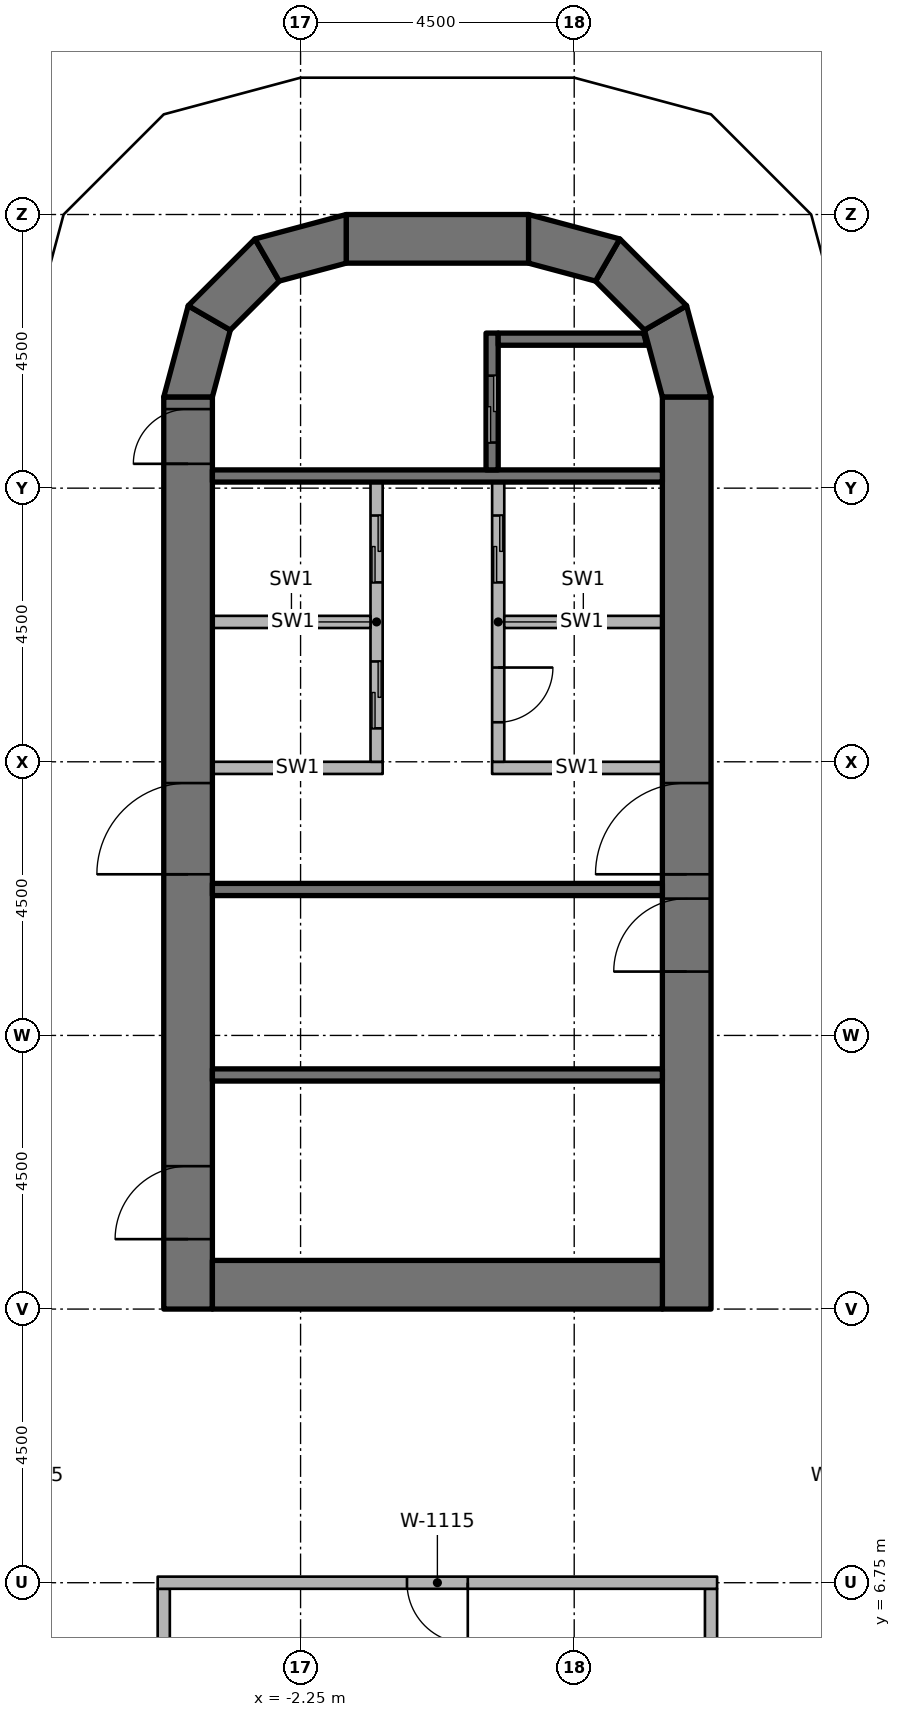
"""IFC4 building model, lengths in metres.
Left out: names, types, materials, properties, quantities, classifications, styles, units other than length and angle.
Written with IfcOpenShell. Run it as: python <this file> out.ifc"""

import sys

from ifc_helpers import new_model, si_unit, direction, frame, frame_2d, origin, origin_2d, place, context, subcontext, project, spatial, polyline, rectangle, outline, extrude, element, fill, save


model = new_model("IFC4")
c1 = context("Model", 3, precision=1e-05, world=origin(), true_north=direction((0.0, 1.0)))
c2 = subcontext(c1, "Body", "Model", "MODEL_VIEW")
j1 = project(units=[si_unit("LENGTHUNIT", "METRE"), si_unit("PLANEANGLEUNIT", "RADIAN")], contexts=[c1])
p1 = place(None, origin())
s1 = spatial("IfcSite", under=j1, at=p1, CompositionType="ELEMENT")
p2 = place(p1, origin())
s2 = spatial("IfcBuilding", under=s1, at=p2, CompositionType="ELEMENT")
p3 = place(p2, frame((0.0, 0.0, 124.6)))
s3 = spatial("IfcBuildingStorey", under=s2, at=p3, CompositionType="ELEMENT", Elevation=124.6)
for number, where, z_axis, x_axis in (
    (1, (-6.25, 6.25, 0.0), (0.0, 0.0, 1.0), (1.0, 0.0, 0.0)),
    (2, (-6.25, 10.75, 0.0), (0.0, 0.0, 1.0), (1.0, 0.0, 0.0)),
    (3, (-6.25, 15.75, 0.0), (0.0, 0.0, 1.0), (1.0, 0.0, 0.0)),
    (4, (-6.25, 20.25, 0.0), (0.0, 0.0, 1.0), (1.0, 0.0, 0.0)),
    (5, (-6.25, 24.65, 0.0), (0.0, 0.0, 1.0), (1.0, 0.0, 0.0)),
    (6, (-6.25, 26.7, 0.0), (0.0, 0.0, 1.0), (1.0, 0.0, 0.0)),
    (7, (6.25, 6.25, 0.0), (0.0, 0.0, 1.0), (1.0, 0.0, 0.0)),
    (8, (6.25, 10.75, 0.0), (0.0, 0.0, 1.0), (1.0, 0.0, 0.0)),
    (9, (6.25, 15.75, 0.0), (0.0, 0.0, 1.0), (1.0, 0.0, 0.0)),
    (10, (6.25, 20.25, 0.0), (0.0, 0.0, 1.0), (1.0, 0.0, 0.0)),
    (11, (6.25, 24.65, 0.0), (0.0, 0.0, 1.0), (1.0, 0.0, 0.0)),
    (12, (6.25, 26.7, 0.0), (0.0, 0.0, 1.0), (1.0, 0.0, 0.0)),
):
    element("IfcColumn", number, at=place(p3, frame(where, z_axis=z_axis, x_axis=x_axis)), inside=s3, PredefinedType="COLUMN", context=c2, shape_type="SweptSolid", body=[
        extrude(rectangle(XDim=0.9, YDim=0.9, at=origin_2d()), origin(), (0.0, 0.0, 1.0), 3.65),
    ])
p4 = place(p3, frame((-4.1, 11.25, 0.0), z_axis=(0.0, 0.0, 1.0), x_axis=(0.0, 1.0, 0.0)))
e13 = element("IfcWall", 13, at=p4, inside=s3, PredefinedType="SHEAR", context=c2, shape_type="SweptSolid", body=[
    extrude(rectangle(XDim=15.0, YDim=0.8, at=frame_2d((7.5, 0.0))), origin(), (0.0, 0.0, 1.0), 3.8),
])
p5 = place(p4, frame((7.15, 0.0, 0.0)))
e14 = element("IfcOpeningElement", 14, at=p5, cuts=e13, PredefinedType="OPENING", context=c2, shape_type="SweptSolid", body=[
    extrude(rectangle(XDim=1.5, YDim=2.3, at=frame_2d((0.75, 1.15))), frame((0.0, 0.41, 0.0), z_axis=(0.0, -1.0, 0.0), x_axis=(1.0, 0.0, 0.0)), (0.0, 0.0, 1.0), 0.82),
])
p6 = place(p4, frame((13.9, 0.0, 0.0)))
e15 = element("IfcOpeningElement", 15, at=p6, cuts=e13, PredefinedType="OPENING", context=c2, shape_type="SweptSolid", body=[
    extrude(rectangle(XDim=0.9, YDim=2.1, at=frame_2d((0.45, 1.05))), frame((0.0, 0.41, 0.0), z_axis=(0.0, -1.0, 0.0), x_axis=(1.0, 0.0, 0.0)), (0.0, 0.0, 1.0), 0.82),
])
p7 = place(p4, frame((1.15, 0.0, 0.0)))
e16 = element("IfcOpeningElement", 16, at=p7, cuts=e13, PredefinedType="OPENING", context=c2, shape_type="SweptSolid", body=[
    extrude(rectangle(XDim=1.2, YDim=2.1, at=frame_2d((0.6, 1.05))), frame((0.0, 0.41, 0.0), z_axis=(0.0, -1.0, 0.0), x_axis=(1.0, 0.0, 0.0)), (0.0, 0.0, 1.0), 0.82),
])
p8 = place(p3, frame((4.1, 11.25, 0.0), z_axis=(0.0, 0.0, 1.0), x_axis=(0.0, 1.0, 0.0)))
e17 = element("IfcWall", 17, at=p8, inside=s3, PredefinedType="SHEAR", context=c2, shape_type="SweptSolid", body=[
    extrude(rectangle(XDim=15.0, YDim=0.8, at=frame_2d((7.5, 0.0))), origin(), (0.0, 0.0, 1.0), 3.8),
])
p9 = place(p8, frame((7.15, 0.0, 0.0)))
e18 = element("IfcOpeningElement", 18, at=p9, cuts=e17, PredefinedType="OPENING", context=c2, shape_type="SweptSolid", body=[
    extrude(rectangle(XDim=1.5, YDim=2.3, at=frame_2d((0.75, 1.15))), frame((0.0, 0.41, 0.0), z_axis=(0.0, -1.0, 0.0), x_axis=(1.0, 0.0, 0.0)), (0.0, 0.0, 1.0), 0.82),
])
p10 = place(p8, frame((5.55, 0.0, 0.0)))
e19 = element("IfcOpeningElement", 19, at=p10, cuts=e17, PredefinedType="OPENING", context=c2, shape_type="SweptSolid", body=[
    extrude(rectangle(XDim=1.2, YDim=2.1, at=frame_2d((0.6, 1.05))), frame((0.0, 0.41, 0.0), z_axis=(0.0, -1.0, 0.0), x_axis=(1.0, 0.0, 0.0)), (0.0, 0.0, 1.0), 0.82),
])
p11 = place(p3, frame((-3.7, 11.65, 0.0), z_axis=(0.0, 0.0, 1.0), x_axis=(1.0, 0.0, 0.0)))
e20 = element("IfcWall", 20, at=p11, inside=s3, PredefinedType="SHEAR", context=c2, shape_type="SweptSolid", body=[
    extrude(rectangle(XDim=7.4, YDim=0.8, at=frame_2d((3.7, 0.0))), origin(), (0.0, 0.0, 1.0), 3.8),
])
p12 = place(p3, frame((-1.5, 28.85, 0.0), z_axis=(0.0, 0.0, 1.0), x_axis=(1.0, 0.0, 0.0)))
e21 = element("IfcWall", 21, at=p12, inside=s3, PredefinedType="SHEAR", context=c2, shape_type="SweptSolid", body=[
    extrude(rectangle(XDim=3.0, YDim=0.8, at=frame_2d((1.5, 0.0))), origin(), (0.0, 0.0, 1.0), 3.8),
])
p13 = place(p3, origin())
e22 = element("IfcWall", 22, at=p13, inside=s3, PredefinedType="SHEAR", context=c2, shape_type="SweptSolid", body=[
    extrude(outline(polyline([(-4.5, 26.25), (-4.098, 27.75), (-3.405, 27.35), (-3.7, 26.25), (-4.5, 26.25)])), origin(), (0.0, 0.0, 1.0), 3.8),
])
p14 = place(p3, origin())
e23 = element("IfcWall", 23, at=p14, inside=s3, PredefinedType="SHEAR", context=c2, shape_type="SweptSolid", body=[
    extrude(outline(polyline([(-4.098, 27.75), (-3.0, 28.848), (-2.6, 28.155), (-3.405, 27.35), (-4.098, 27.75)])), origin(), (0.0, 0.0, 1.0), 3.8),
])
p15 = place(p3, origin())
e24 = element("IfcWall", 24, at=p15, inside=s3, PredefinedType="SHEAR", context=c2, shape_type="SweptSolid", body=[
    extrude(outline(polyline([(-3.0, 28.848), (-1.5, 29.25), (-1.5, 28.45), (-2.6, 28.155), (-3.0, 28.848)])), origin(), (0.0, 0.0, 1.0), 3.8),
])
p16 = place(p3, origin())
e25 = element("IfcWall", 25, at=p16, inside=s3, PredefinedType="SHEAR", context=c2, shape_type="SweptSolid", body=[
    extrude(outline(polyline([(4.5, 26.25), (4.098, 27.75), (3.405, 27.35), (3.7, 26.25), (4.5, 26.25)])), origin(), (0.0, 0.0, 1.0), 3.8),
])
p17 = place(p3, origin())
e26 = element("IfcWall", 26, at=p17, inside=s3, PredefinedType="SHEAR", context=c2, shape_type="SweptSolid", body=[
    extrude(outline(polyline([(4.098, 27.75), (3.0, 28.848), (2.6, 28.155), (3.405, 27.35), (4.098, 27.75)])), origin(), (0.0, 0.0, 1.0), 3.8),
])
p18 = place(p3, origin())
e27 = element("IfcWall", 27, at=p18, inside=s3, PredefinedType="SHEAR", context=c2, shape_type="SweptSolid", body=[
    extrude(outline(polyline([(3.0, 28.848), (1.5, 29.25), (1.5, 28.45), (2.6, 28.155), (3.0, 28.848)])), origin(), (0.0, 0.0, 1.0), 3.8),
])
p19 = place(p3, frame((-3.7, 24.95, 0.0), z_axis=(0.0, 0.0, 1.0), x_axis=(1.0, 0.0, 0.0)))
e28 = element("IfcWall", 28, at=p19, inside=s3, PredefinedType="SHEAR", context=c2, shape_type="SweptSolid", body=[
    extrude(rectangle(XDim=7.4, YDim=0.2, at=frame_2d((3.7, 0.0))), origin(), (0.0, 0.0, 1.0), 3.65),
])
p20 = place(p3, frame((0.9, 27.3, 0.0), z_axis=(0.0, 0.0, 1.0), x_axis=(0.0, -1.0, 0.0)))
e29 = element("IfcWall", 29, at=p20, inside=s3, PredefinedType="SHEAR", context=c2, shape_type="SweptSolid", body=[
    extrude(rectangle(XDim=2.25, YDim=0.2, at=frame_2d((1.125, 0.0))), origin(), (0.0, 0.0, 1.0), 3.65),
])
p21 = place(p20, frame((0.7, 0.0, 0.0)))
e30 = element("IfcOpeningElement", 30, at=p21, cuts=e29, PredefinedType="OPENING", context=c2, shape_type="SweptSolid", body=[
    extrude(rectangle(XDim=1.1, YDim=2.3, at=frame_2d((0.55, 1.15))), frame((0.0, 0.11, 0.0), z_axis=(0.0, -1.0, 0.0), x_axis=(1.0, 0.0, 0.0)), (0.0, 0.0, 1.0), 0.22),
])
p22 = place(p3, origin())
e31 = element("IfcWall", 31, at=p22, inside=s3, PredefinedType="SHEAR", context=c2, shape_type="SweptSolid", body=[
    extrude(outline(polyline([(1.0, 27.1), (3.444, 27.1), (3.39, 27.3), (1.0, 27.3), (1.0, 27.1)])), origin(), (0.0, 0.0, 1.0), 3.65),
])
for number, where, z_axis, x_axis in (
    (32, (-3.7, 18.15, 0.0), (0.0, 0.0, 1.0), (1.0, 0.0, 0.0)),
    (33, (-3.7, 15.1, 0.0), (0.0, 0.0, 1.0), (1.0, 0.0, 0.0)),
):
    element("IfcWall", number, at=place(p3, frame(where, z_axis=z_axis, x_axis=x_axis)), inside=s3, PredefinedType="SHEAR", context=c2, shape_type="SweptSolid", body=[
        extrude(rectangle(XDim=7.4, YDim=0.2, at=frame_2d((3.7, 0.0))), origin(), (0.0, 0.0, 1.0), 3.65),
    ])
p23 = place(p3, frame((-3.7, 20.15, 0.0), z_axis=(0.0, 0.0, 1.0), x_axis=(1.0, 0.0, 0.0)))
e34 = element("IfcWall", 34, at=p23, inside=s3, PredefinedType="PARTITIONING", context=c2, shape_type="SweptSolid", body=[
    extrude(rectangle(XDim=2.8, YDim=0.2, at=frame_2d((1.4, 0.0))), origin(), (0.0, 0.0, 1.0), 3.65),
])
p24 = place(p3, frame((-1.0, 24.85, 0.0), z_axis=(0.0, 0.0, 1.0), x_axis=(0.0, -1.0, 0.0)))
e35 = element("IfcWall", 35, at=p24, inside=s3, PredefinedType="PARTITIONING", context=c2, shape_type="SweptSolid", body=[
    extrude(rectangle(XDim=4.6, YDim=0.2, at=frame_2d((2.3, 0.0))), origin(), (0.0, 0.0, 1.0), 3.65),
])
p25 = place(p24, frame((0.55, 0.0, 0.0)))
e36 = element("IfcOpeningElement", 36, at=p25, cuts=e35, PredefinedType="OPENING", context=c2, shape_type="SweptSolid", body=[
    extrude(rectangle(XDim=1.1, YDim=2.3, at=frame_2d((0.55, 1.15))), frame((0.0, 0.11, 0.0), z_axis=(0.0, -1.0, 0.0), x_axis=(1.0, 0.0, 0.0)), (0.0, 0.0, 1.0), 0.22),
])
p26 = place(p24, frame((2.95, 0.0, 0.0)))
e37 = element("IfcOpeningElement", 37, at=p26, cuts=e35, PredefinedType="OPENING", context=c2, shape_type="SweptSolid", body=[
    extrude(rectangle(XDim=1.1, YDim=2.3, at=frame_2d((0.55, 1.15))), frame((0.0, 0.11, 0.0), z_axis=(0.0, -1.0, 0.0), x_axis=(1.0, 0.0, 0.0)), (0.0, 0.0, 1.0), 0.22),
])
p27 = place(p3, frame((0.9, 20.15, 0.0), z_axis=(0.0, 0.0, 1.0), x_axis=(1.0, 0.0, 0.0)))
e38 = element("IfcWall", 38, at=p27, inside=s3, PredefinedType="PARTITIONING", context=c2, shape_type="SweptSolid", body=[
    extrude(rectangle(XDim=2.8, YDim=0.2, at=frame_2d((1.4, 0.0))), origin(), (0.0, 0.0, 1.0), 3.65),
])
p28 = place(p3, frame((1.0, 24.85, 0.0), z_axis=(0.0, 0.0, 1.0), x_axis=(0.0, -1.0, 0.0)))
e39 = element("IfcWall", 39, at=p28, inside=s3, PredefinedType="PARTITIONING", context=c2, shape_type="SweptSolid", body=[
    extrude(rectangle(XDim=4.6, YDim=0.2, at=frame_2d((2.3, 0.0))), origin(), (0.0, 0.0, 1.0), 3.65),
])
p29 = place(p28, frame((0.55, 0.0, 0.0)))
e40 = element("IfcOpeningElement", 40, at=p29, cuts=e39, PredefinedType="OPENING", context=c2, shape_type="SweptSolid", body=[
    extrude(rectangle(XDim=1.1, YDim=2.3, at=frame_2d((0.55, 1.15))), frame((0.0, 0.11, 0.0), z_axis=(0.0, -1.0, 0.0), x_axis=(1.0, 0.0, 0.0)), (0.0, 0.0, 1.0), 0.22),
])
p30 = place(p28, frame((3.05, 0.0, 0.0)))
e41 = element("IfcOpeningElement", 41, at=p30, cuts=e39, PredefinedType="OPENING", context=c2, shape_type="SweptSolid", body=[
    extrude(rectangle(XDim=0.9, YDim=2.1, at=frame_2d((0.45, 1.05))), frame((0.0, 0.11, 0.0), z_axis=(0.0, -1.0, 0.0), x_axis=(1.0, 0.0, 0.0)), (0.0, 0.0, 1.0), 0.22),
])
for number, where, z_axis, x_axis in (
    (42, (-3.7, 22.55, 0.0), (0.0, 0.0, 1.0), (1.0, 0.0, 0.0)),
    (43, (1.1, 22.55, 0.0), (0.0, 0.0, 1.0), (1.0, 0.0, 0.0)),
):
    element("IfcWall", number, at=place(p3, frame(where, z_axis=z_axis, x_axis=x_axis)), inside=s3, PredefinedType="PARTITIONING", context=c2, shape_type="SweptSolid", body=[
        extrude(rectangle(XDim=2.6, YDim=0.2, at=frame_2d((1.3, 0.0))), origin(), (0.0, 0.0, 1.0), 3.65),
    ])
for number, where, z_axis, x_axis in (
    (44, (-4.5, 2.35, 0.0), (0.0, 0.0, 1.0), (0.0, 1.0, 0.0)),
    (45, (4.5, 2.35, 0.0), (0.0, 0.0, 1.0), (0.0, 1.0, 0.0)),
):
    element("IfcWall", number, at=place(p3, frame(where, z_axis=z_axis, x_axis=x_axis)), inside=s3, PredefinedType="PARTITIONING", context=c2, shape_type="SweptSolid", body=[
        extrude(rectangle(XDim=4.3, YDim=0.2, at=frame_2d((2.15, 0.0))), origin(), (0.0, 0.0, 1.0), 2.738),
    ])
p31 = place(p3, frame((4.6, 6.75, 0.0), z_axis=(0.0, 0.0, 1.0), x_axis=(-1.0, 0.0, 0.0)))
e46 = element("IfcWall", 46, at=p31, inside=s3, PredefinedType="PARTITIONING", context=c2, shape_type="SweptSolid", body=[
    extrude(rectangle(XDim=9.2, YDim=0.2, at=frame_2d((4.6, 0.0))), origin(), (0.0, 0.0, 1.0), 2.738),
])
p32 = place(p31, frame((4.1, 0.0, 0.0)))
e47 = element("IfcOpeningElement", 47, at=p32, cuts=e46, PredefinedType="OPENING", context=c2, shape_type="SweptSolid", body=[
    extrude(rectangle(XDim=1.0, YDim=2.1, at=frame_2d((0.5, 1.05))), frame((0.0, 0.11, 0.0), z_axis=(0.0, -1.0, 0.0), x_axis=(1.0, 0.0, 0.0)), (0.0, 0.0, 1.0), 0.22),
])
p33 = place(p5, origin())
e48 = element("IfcDoor", 48, at=p33, inside=s3, OperationType="DOUBLE_DOOR_SINGLE_SWING", PredefinedType="DOOR", context=c2, shape_type="SweptSolid", body=[
    extrude(rectangle(XDim=1.5, YDim=2.3, at=frame_2d((0.75, 1.15))), frame((0.0, 0.025, 0.0), z_axis=(0.0, -1.0, 0.0), x_axis=(1.0, 0.0, 0.0)), (0.0, 0.0, 1.0), 0.05),
])
fill(e14, e48)
p34 = place(p9, origin())
e49 = element("IfcDoor", 49, at=p34, inside=s3, OperationType="DOUBLE_DOOR_SINGLE_SWING", PredefinedType="DOOR", context=c2, shape_type="SweptSolid", body=[
    extrude(rectangle(XDim=1.5, YDim=2.3, at=frame_2d((0.75, 1.15))), frame((0.0, 0.025, 0.0), z_axis=(0.0, -1.0, 0.0), x_axis=(1.0, 0.0, 0.0)), (0.0, 0.0, 1.0), 0.05),
])
fill(e18, e49)
p35 = place(p6, origin())
e50 = element("IfcDoor", 50, at=p35, inside=s3, OperationType="SINGLE_SWING_RIGHT", PredefinedType="DOOR", context=c2, shape_type="SweptSolid", body=[
    extrude(rectangle(XDim=0.9, YDim=2.1, at=frame_2d((0.45, 1.05))), frame((0.0, 0.025, 0.0), z_axis=(0.0, -1.0, 0.0), x_axis=(1.0, 0.0, 0.0)), (0.0, 0.0, 1.0), 0.05),
])
fill(e15, e50)
p36 = place(p10, origin())
e51 = element("IfcDoor", 51, at=p36, inside=s3, OperationType="SINGLE_SWING_RIGHT", PredefinedType="DOOR", context=c2, shape_type="SweptSolid", body=[
    extrude(rectangle(XDim=1.2, YDim=2.1, at=frame_2d((0.6, 1.05))), frame((0.0, 0.025, 0.0), z_axis=(0.0, -1.0, 0.0), x_axis=(1.0, 0.0, 0.0)), (0.0, 0.0, 1.0), 0.05),
])
fill(e19, e51)
p37 = place(p7, origin())
e52 = element("IfcDoor", 52, at=p37, inside=s3, OperationType="SINGLE_SWING_LEFT", PredefinedType="DOOR", context=c2, shape_type="SweptSolid", body=[
    extrude(rectangle(XDim=1.2, YDim=2.1, at=frame_2d((0.6, 1.05))), frame((0.0, 0.025, 0.0), z_axis=(0.0, -1.0, 0.0), x_axis=(1.0, 0.0, 0.0)), (0.0, 0.0, 1.0), 0.05),
])
fill(e16, e52)
p38 = place(p21, origin())
e53 = element("IfcDoor", 53, at=p38, inside=s3, OperationType="DOUBLE_DOOR_SLIDING", PredefinedType="DOOR", context=c2, shape_type="SweptSolid", body=[
    extrude(rectangle(XDim=1.1, YDim=2.3, at=frame_2d((0.55, 1.15))), frame((0.0, 0.025, 0.0), z_axis=(0.0, -1.0, 0.0), x_axis=(1.0, 0.0, 0.0)), (0.0, 0.0, 1.0), 0.05),
])
fill(e30, e53)
p39 = place(p25, origin())
e54 = element("IfcDoor", 54, at=p39, inside=s3, OperationType="DOUBLE_DOOR_SLIDING", PredefinedType="DOOR", context=c2, shape_type="SweptSolid", body=[
    extrude(rectangle(XDim=1.1, YDim=2.3, at=frame_2d((0.55, 1.15))), frame((0.0, 0.025, 0.0), z_axis=(0.0, -1.0, 0.0), x_axis=(1.0, 0.0, 0.0)), (0.0, 0.0, 1.0), 0.05),
])
fill(e36, e54)
p40 = place(p26, origin())
e55 = element("IfcDoor", 55, at=p40, inside=s3, OperationType="DOUBLE_DOOR_SLIDING", PredefinedType="DOOR", context=c2, shape_type="SweptSolid", body=[
    extrude(rectangle(XDim=1.1, YDim=2.3, at=frame_2d((0.55, 1.15))), frame((0.0, 0.025, 0.0), z_axis=(0.0, -1.0, 0.0), x_axis=(1.0, 0.0, 0.0)), (0.0, 0.0, 1.0), 0.05),
])
fill(e37, e55)
p41 = place(p29, origin())
e56 = element("IfcDoor", 56, at=p41, inside=s3, OperationType="DOUBLE_DOOR_SLIDING", PredefinedType="DOOR", context=c2, shape_type="SweptSolid", body=[
    extrude(rectangle(XDim=1.1, YDim=2.3, at=frame_2d((0.55, 1.15))), frame((0.0, 0.025, 0.0), z_axis=(0.0, -1.0, 0.0), x_axis=(1.0, 0.0, 0.0)), (0.0, 0.0, 1.0), 0.05),
])
fill(e40, e56)
p42 = place(p30, origin())
e57 = element("IfcDoor", 57, at=p42, inside=s3, OperationType="SINGLE_SWING_RIGHT", PredefinedType="DOOR", context=c2, shape_type="SweptSolid", body=[
    extrude(rectangle(XDim=0.9, YDim=2.1, at=frame_2d((0.45, 1.05))), frame((0.0, 0.025, 0.0), z_axis=(0.0, -1.0, 0.0), x_axis=(1.0, 0.0, 0.0)), (0.0, 0.0, 1.0), 0.05),
])
fill(e41, e57)
p43 = place(p32, origin())
e58 = element("IfcDoor", 58, at=p43, inside=s3, OperationType="SINGLE_SWING_RIGHT", PredefinedType="DOOR", context=c2, shape_type="SweptSolid", body=[
    extrude(rectangle(XDim=1.0, YDim=2.1, at=frame_2d((0.5, 1.05))), frame((0.0, 0.025, 0.0), z_axis=(0.0, -1.0, 0.0), x_axis=(1.0, 0.0, 0.0)), (0.0, 0.0, 1.0), 0.05),
])
fill(e47, e58)
save(model, sys.argv[1])
